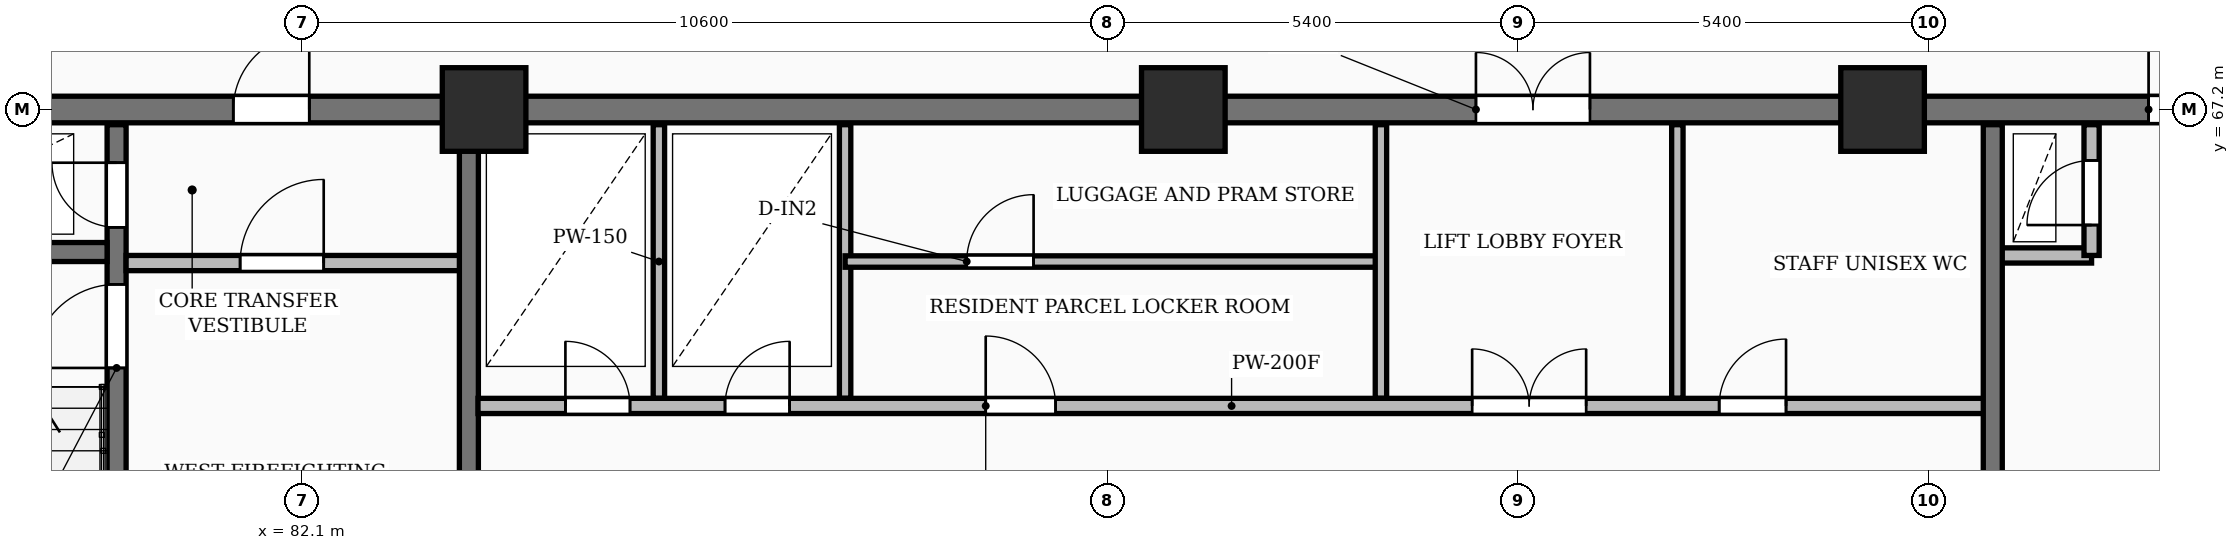
"""IFC4 building model, lengths in metres.
Left out: names, types, materials, properties, quantities, classifications, styles, units other than length and angle.
Written with IfcOpenShell. Run it as: python <this file> out.ifc"""

import sys

from ifc_helpers import new_model, si_unit, direction, frame, frame_2d, origin, origin_2d, place, context, subcontext, project, spatial, rectangle, extrude, element, fill, save


model = new_model("IFC4")
c1 = context("Model", 3, precision=1e-05, world=origin(), true_north=direction((0.0, 1.0)))
c2 = subcontext(c1, "Body", "Model", "MODEL_VIEW")
j1 = project(units=[si_unit("LENGTHUNIT", "METRE"), si_unit("PLANEANGLEUNIT", "RADIAN")], contexts=[c1])
p1 = place(None, origin())
s1 = spatial("IfcSite", under=j1, at=p1, CompositionType="ELEMENT")
p2 = place(p1, origin())
s2 = spatial("IfcBuilding", under=s1, at=p2, CompositionType="ELEMENT")
p3 = place(p2, frame((0.0, 0.0, -3.6)))
s3 = spatial("IfcBuildingStorey", under=s2, at=p3, CompositionType="ELEMENT", Elevation=-3.6)
for number, where, z_axis, x_axis in (
    (1, (84.5, 67.2, 0.0), (0.0, 0.0, 1.0), (1.0, 0.0, 0.0)),
    (2, (93.7, 67.2, 0.0), (0.0, 0.0, 1.0), (1.0, 0.0, 0.0)),
    (3, (102.9, 67.2, 0.0), (0.0, 0.0, 1.0), (1.0, 0.0, 0.0)),
):
    element("IfcColumn", number, at=place(p3, frame(where, z_axis=z_axis, x_axis=x_axis)), inside=s3, PredefinedType="COLUMN", context=c2, shape_type="SweptSolid", body=[
        extrude(rectangle(XDim=1.1, YDim=1.1, at=origin_2d()), origin(), (0.0, 0.0, 1.0), 3.6),
    ])
p4 = place(p3, frame((75.95, 67.2, 0.0), z_axis=(0.0, 0.0, 1.0), x_axis=(1.0, 0.0, 0.0)))
e4 = element("IfcWall", 4, at=p4, inside=s3, PredefinedType="SHEAR", context=c2, shape_type="SweptSolid", body=[
    extrude(rectangle(XDim=36.3, YDim=0.35, at=frame_2d((18.15, 0.0))), origin(), (0.0, 0.0, 1.0), 3.6),
])
p5 = place(p4, frame((5.25, 0.0, 0.0)))
e5 = element("IfcOpeningElement", 5, at=p5, cuts=e4, PredefinedType="OPENING", context=c2, shape_type="SweptSolid", body=[
    extrude(rectangle(XDim=1.0, YDim=2.15, at=frame_2d((0.5, 1.075))), frame((0.0, 0.185, 0.0), z_axis=(0.0, -1.0, 0.0), x_axis=(1.0, 0.0, 0.0)), (0.0, 0.0, 1.0), 0.37),
])
p6 = place(p4, frame((21.6, 0.0, 0.0)))
e6 = element("IfcOpeningElement", 6, at=p6, cuts=e4, PredefinedType="OPENING", context=c2, shape_type="SweptSolid", body=[
    extrude(rectangle(XDim=1.5, YDim=2.2, at=frame_2d((0.75, 1.1))), frame((0.0, 0.185, 0.0), z_axis=(0.0, -1.0, 0.0), x_axis=(1.0, 0.0, 0.0)), (0.0, 0.0, 1.0), 0.37),
])
p7 = place(p4, frame((30.45, 0.0, 0.0)))
e7 = element("IfcOpeningElement", 7, at=p7, cuts=e4, PredefinedType="OPENING", context=c2, shape_type="SweptSolid", body=[
    extrude(rectangle(XDim=1.0, YDim=2.15, at=frame_2d((0.5, 1.075))), frame((0.0, 0.185, 0.0), z_axis=(0.0, -1.0, 0.0), x_axis=(1.0, 0.0, 0.0)), (0.0, 0.0, 1.0), 0.37),
])
p8 = place(p3, frame((79.665, 55.4, 0.0), z_axis=(0.0, 0.0, 1.0), x_axis=(0.0, 1.0, 0.0)))
e8 = element("IfcWall", 8, at=p8, inside=s3, PredefinedType="SHEAR", context=c2, shape_type="SweptSolid", body=[
    extrude(rectangle(XDim=11.6, YDim=0.25, at=frame_2d((5.8, 0.0))), origin(), (0.0, 0.0, 1.0), 3.6),
])
p9 = place(p8, frame((0.55, 0.0, 0.0)))
e9 = element("IfcOpeningElement", 9, at=p9, cuts=e8, PredefinedType="OPENING", context=c2, shape_type="SweptSolid", body=[
    extrude(rectangle(XDim=0.85, YDim=2.05, at=frame_2d((0.425, 1.025))), frame((0.0, 0.135, 0.0), z_axis=(0.0, -1.0, 0.0), x_axis=(1.0, 0.0, 0.0)), (0.0, 0.0, 1.0), 0.27),
])
p10 = place(p8, frame((8.4, 0.0, 0.0)))
e10 = element("IfcOpeningElement", 10, at=p10, cuts=e8, PredefinedType="OPENING", context=c2, shape_type="SweptSolid", body=[
    extrude(rectangle(XDim=1.1, YDim=2.1, at=frame_2d((0.55, 1.05))), frame((0.0, 0.135, 0.0), z_axis=(0.0, -1.0, 0.0), x_axis=(1.0, 0.0, 0.0)), (0.0, 0.0, 1.0), 0.27),
])
p11 = place(p8, frame((10.25, 0.0, 0.0)))
e11 = element("IfcOpeningElement", 11, at=p11, cuts=e8, PredefinedType="OPENING", context=c2, shape_type="SweptSolid", body=[
    extrude(rectangle(XDim=0.85, YDim=2.05, at=frame_2d((0.425, 1.025))), frame((0.0, 0.135, 0.0), z_axis=(0.0, -1.0, 0.0), x_axis=(1.0, 0.0, 0.0)), (0.0, 0.0, 1.0), 0.27),
])
p12 = place(p3, frame((76.3, 65.325, 0.0), z_axis=(0.0, 0.0, 1.0), x_axis=(1.0, 0.0, 0.0)))
e12 = element("IfcWall", 12, at=p12, inside=s3, PredefinedType="SHEAR", context=c2, shape_type="SweptSolid", body=[
    extrude(rectangle(XDim=3.24, YDim=0.25, at=frame_2d((1.62, 0.0))), origin(), (0.0, 0.0, 1.0), 3.6),
])
p13 = place(p3, frame((79.79, 65.18, 0.0), z_axis=(0.0, 0.0, 1.0), x_axis=(1.0, 0.0, 0.0)))
e13 = element("IfcWall", 13, at=p13, inside=s3, PredefinedType="PARTITIONING", context=c2, shape_type="SweptSolid", body=[
    extrude(rectangle(XDim=4.39, YDim=0.2, at=frame_2d((2.195, 0.0))), origin(), (0.0, 0.0, 1.0), 3.3),
])
p14 = place(p13, frame((1.5, 0.0, 0.0)))
e14 = element("IfcOpeningElement", 14, at=p14, cuts=e13, PredefinedType="OPENING", context=c2, shape_type="SweptSolid", body=[
    extrude(rectangle(XDim=1.1, YDim=2.1, at=frame_2d((0.55, 1.05))), frame((0.0, 0.11, 0.0), z_axis=(0.0, -1.0, 0.0), x_axis=(1.0, 0.0, 0.0)), (0.0, 0.0, 1.0), 0.22),
])
p15 = place(p3, frame((84.3, 55.4, 0.0), z_axis=(0.0, 0.0, 1.0), x_axis=(0.0, 1.0, 0.0)))
e15 = element("IfcWall", 15, at=p15, inside=s3, PredefinedType="SHEAR", context=c2, shape_type="SweptSolid", body=[
    extrude(rectangle(XDim=11.6, YDim=0.25, at=frame_2d((5.8, 0.0))), origin(), (0.0, 0.0, 1.0), 3.6),
])
p16 = place(p15, frame((5.2, 0.0, 0.0)))
e16 = element("IfcOpeningElement", 16, at=p16, cuts=e15, PredefinedType="OPENING", context=c2, shape_type="SweptSolid", body=[
    extrude(rectangle(XDim=1.1, YDim=2.1, at=frame_2d((0.55, 1.05))), frame((0.0, 0.135, 0.0), z_axis=(0.0, -1.0, 0.0), x_axis=(1.0, 0.0, 0.0)), (0.0, 0.0, 1.0), 0.27),
])
for number, where, z_axis, x_axis in (
    (17, (86.8, 63.4, 0.0), (0.0, 0.0, 1.0), (0.0, 1.0, 0.0)),
    (18, (89.25, 63.4, 0.0), (0.0, 0.0, 1.0), (0.0, 1.0, 0.0)),
):
    element("IfcWall", number, at=place(p3, frame(where, z_axis=z_axis, x_axis=x_axis)), inside=s3, PredefinedType="PARTITIONING", context=c2, shape_type="SweptSolid", body=[
        extrude(rectangle(XDim=3.6, YDim=0.15, at=frame_2d((1.8, 0.0))), origin(), (0.0, 0.0, 1.0), 3.3),
    ])
p17 = place(p3, frame((89.25, 65.2, 0.0), z_axis=(0.0, 0.0, 1.0), x_axis=(1.0, 0.0, 0.0)))
e19 = element("IfcWall", 19, at=p17, inside=s3, PredefinedType="PARTITIONING", context=c2, shape_type="SweptSolid", body=[
    extrude(rectangle(XDim=7.05, YDim=0.15, at=frame_2d((3.525, 0.0))), origin(), (0.0, 0.0, 1.0), 3.3),
])
p18 = place(p17, frame((1.6, 0.0, 0.0)))
e20 = element("IfcOpeningElement", 20, at=p18, cuts=e19, PredefinedType="OPENING", context=c2, shape_type="SweptSolid", body=[
    extrude(rectangle(XDim=0.88, YDim=2.06, at=frame_2d((0.44, 1.03))), frame((0.0, 0.085, 0.0), z_axis=(0.0, -1.0, 0.0), x_axis=(1.0, 0.0, 0.0)), (0.0, 0.0, 1.0), 0.17),
])
for number, where, z_axis, x_axis in (
    (21, (96.3, 63.4, 0.0), (0.0, 0.0, 1.0), (0.0, 1.0, 0.0)),
    (22, (100.2, 63.4, 0.0), (0.0, 0.0, 1.0), (0.0, 1.0, 0.0)),
):
    element("IfcWall", number, at=place(p3, frame(where, z_axis=z_axis, x_axis=x_axis)), inside=s3, PredefinedType="PARTITIONING", context=c2, shape_type="SweptSolid", body=[
        extrude(rectangle(XDim=3.6, YDim=0.15, at=frame_2d((1.8, 0.0))), origin(), (0.0, 0.0, 1.0), 3.3),
    ])
p19 = place(p3, frame((84.42, 63.3, 0.0), z_axis=(0.0, 0.0, 1.0), x_axis=(1.0, 0.0, 0.0)))
e23 = element("IfcWall", 23, at=p19, inside=s3, PredefinedType="PARTITIONING", context=c2, shape_type="SweptSolid", body=[
    extrude(rectangle(XDim=19.83, YDim=0.2, at=frame_2d((9.915, 0.0))), origin(), (0.0, 0.0, 1.0), 3.3),
])
p20 = place(p19, frame((1.15, 0.0, 0.0)))
e24 = element("IfcOpeningElement", 24, at=p20, cuts=e23, PredefinedType="OPENING", context=c2, shape_type="SweptSolid", body=[
    extrude(rectangle(XDim=0.85, YDim=2.05, at=frame_2d((0.425, 1.025))), frame((0.0, 0.11, 0.0), z_axis=(0.0, -1.0, 0.0), x_axis=(1.0, 0.0, 0.0)), (0.0, 0.0, 1.0), 0.22),
])
p21 = place(p19, frame((3.25, 0.0, 0.0)))
e25 = element("IfcOpeningElement", 25, at=p21, cuts=e23, PredefinedType="OPENING", context=c2, shape_type="SweptSolid", body=[
    extrude(rectangle(XDim=0.85, YDim=2.05, at=frame_2d((0.425, 1.025))), frame((0.0, 0.11, 0.0), z_axis=(0.0, -1.0, 0.0), x_axis=(1.0, 0.0, 0.0)), (0.0, 0.0, 1.0), 0.22),
])
p22 = place(p19, frame((13.08, 0.0, 0.0)))
e26 = element("IfcOpeningElement", 26, at=p22, cuts=e23, PredefinedType="OPENING", context=c2, shape_type="SweptSolid", body=[
    extrude(rectangle(XDim=1.5, YDim=2.2, at=frame_2d((0.75, 1.1))), frame((0.0, 0.11, 0.0), z_axis=(0.0, -1.0, 0.0), x_axis=(1.0, 0.0, 0.0)), (0.0, 0.0, 1.0), 0.22),
])
p23 = place(p19, frame((6.68, 0.0, 0.0)))
e27 = element("IfcOpeningElement", 27, at=p23, cuts=e23, PredefinedType="OPENING", context=c2, shape_type="SweptSolid", body=[
    extrude(rectangle(XDim=0.92, YDim=2.08, at=frame_2d((0.46, 1.04))), frame((0.0, 0.11, 0.0), z_axis=(0.0, -1.0, 0.0), x_axis=(1.0, 0.0, 0.0)), (0.0, 0.0, 1.0), 0.22),
])
p24 = place(p19, frame((16.33, 0.0, 0.0)))
e28 = element("IfcOpeningElement", 28, at=p24, cuts=e23, PredefinedType="OPENING", context=c2, shape_type="SweptSolid", body=[
    extrude(rectangle(XDim=0.88, YDim=2.06, at=frame_2d((0.44, 1.03))), frame((0.0, 0.11, 0.0), z_axis=(0.0, -1.0, 0.0), x_axis=(1.0, 0.0, 0.0)), (0.0, 0.0, 1.0), 0.22),
])
p25 = place(p3, frame((104.45, 65.28, 0.0), z_axis=(0.0, 0.0, 1.0), x_axis=(1.0, 0.0, 0.0)))
e29 = element("IfcWall", 29, at=p25, inside=s3, PredefinedType="PARTITIONING", context=c2, shape_type="SweptSolid", body=[
    extrude(rectangle(XDim=1.2, YDim=0.2, at=frame_2d((0.6, 0.0))), origin(), (0.0, 0.0, 1.0), 3.3),
])
p26 = place(p3, frame((105.65, 65.28, 0.0), z_axis=(0.0, 0.0, 1.0), x_axis=(0.0, 1.0, 0.0)))
e30 = element("IfcWall", 30, at=p26, inside=s3, PredefinedType="PARTITIONING", context=c2, shape_type="SweptSolid", body=[
    extrude(rectangle(XDim=1.72, YDim=0.2, at=frame_2d((0.86, 0.0))), origin(), (0.0, 0.0, 1.0), 3.3),
])
p27 = place(p26, frame((0.4, 0.0, 0.0)))
e31 = element("IfcOpeningElement", 31, at=p27, cuts=e30, PredefinedType="OPENING", context=c2, shape_type="SweptSolid", body=[
    extrude(rectangle(XDim=0.85, YDim=2.05, at=frame_2d((0.425, 1.025))), frame((0.0, 0.11, 0.0), z_axis=(0.0, -1.0, 0.0), x_axis=(1.0, 0.0, 0.0)), (0.0, 0.0, 1.0), 0.22),
])
p28 = place(p3, frame((104.35, 58.4, 0.0), z_axis=(0.0, 0.0, 1.0), x_axis=(0.0, 1.0, 0.0)))
e32 = element("IfcWall", 32, at=p28, inside=s3, PredefinedType="SHEAR", context=c2, shape_type="SweptSolid", body=[
    extrude(rectangle(XDim=8.6, YDim=0.25, at=frame_2d((4.3, 0.0))), origin(), (0.0, 0.0, 1.0), 3.6),
])
p29 = place(p28, frame((1.8, 0.0, 0.0)))
e33 = element("IfcOpeningElement", 33, at=p29, cuts=e32, PredefinedType="OPENING", context=c2, shape_type="SweptSolid", body=[
    extrude(rectangle(XDim=1.1, YDim=2.1, at=frame_2d((0.55, 1.05))), frame((0.0, 0.135, 0.0), z_axis=(0.0, -1.0, 0.0), x_axis=(1.0, 0.0, 0.0)), (0.0, 0.0, 1.0), 0.27),
])
p30 = place(p5, origin())
e34 = element("IfcDoor", 34, at=p30, inside=s3, OperationType="SINGLE_SWING_RIGHT", PredefinedType="DOOR", context=c2, shape_type="SweptSolid", body=[
    extrude(rectangle(XDim=1.0, YDim=2.15, at=frame_2d((0.5, 1.075))), frame((0.0, 0.025, 0.0), z_axis=(0.0, -1.0, 0.0), x_axis=(1.0, 0.0, 0.0)), (0.0, 0.0, 1.0), 0.05),
])
fill(e5, e34)
p31 = place(p6, origin())
e35 = element("IfcDoor", 35, at=p31, inside=s3, OperationType="DOUBLE_DOOR_SINGLE_SWING", PredefinedType="DOOR", context=c2, shape_type="SweptSolid", body=[
    extrude(rectangle(XDim=1.5, YDim=2.2, at=frame_2d((0.75, 1.1))), frame((0.0, 0.025, 0.0), z_axis=(0.0, -1.0, 0.0), x_axis=(1.0, 0.0, 0.0)), (0.0, 0.0, 1.0), 0.05),
])
fill(e6, e35)
p32 = place(p7, origin())
e36 = element("IfcDoor", 36, at=p32, inside=s3, OperationType="SINGLE_SWING_LEFT", PredefinedType="DOOR", context=c2, shape_type="SweptSolid", body=[
    extrude(rectangle(XDim=1.0, YDim=2.15, at=frame_2d((0.5, 1.075))), frame((0.0, 0.025, 0.0), z_axis=(0.0, -1.0, 0.0), x_axis=(1.0, 0.0, 0.0)), (0.0, 0.0, 1.0), 0.05),
])
fill(e7, e36)
p33 = place(p10, origin())
e37 = element("IfcDoor", 37, at=p33, inside=s3, OperationType="SINGLE_SWING_LEFT", PredefinedType="DOOR", context=c2, shape_type="SweptSolid", body=[
    extrude(rectangle(XDim=1.1, YDim=2.1, at=frame_2d((0.55, 1.05))), frame((0.0, 0.025, 0.0), z_axis=(0.0, -1.0, 0.0), x_axis=(1.0, 0.0, 0.0)), (0.0, 0.0, 1.0), 0.05),
])
fill(e10, e37)
p34 = place(p11, origin())
e38 = element("IfcDoor", 38, at=p34, inside=s3, OperationType="SINGLE_SWING_RIGHT", PredefinedType="DOOR", context=c2, shape_type="SweptSolid", body=[
    extrude(rectangle(XDim=0.85, YDim=2.05, at=frame_2d((0.425, 1.025))), frame((0.0, 0.025, 0.0), z_axis=(0.0, -1.0, 0.0), x_axis=(1.0, 0.0, 0.0)), (0.0, 0.0, 1.0), 0.05),
])
fill(e11, e38)
p35 = place(p14, origin())
e39 = element("IfcDoor", 39, at=p35, inside=s3, OperationType="SINGLE_SWING_RIGHT", PredefinedType="DOOR", context=c2, shape_type="SweptSolid", body=[
    extrude(rectangle(XDim=1.1, YDim=2.1, at=frame_2d((0.55, 1.05))), frame((0.0, 0.025, 0.0), z_axis=(0.0, -1.0, 0.0), x_axis=(1.0, 0.0, 0.0)), (0.0, 0.0, 1.0), 0.05),
])
fill(e14, e39)
p36 = place(p18, origin())
e40 = element("IfcDoor", 40, at=p36, inside=s3, OperationType="SINGLE_SWING_RIGHT", PredefinedType="DOOR", context=c2, shape_type="SweptSolid", body=[
    extrude(rectangle(XDim=0.88, YDim=2.06, at=frame_2d((0.44, 1.03))), frame((0.0, 0.025, 0.0), z_axis=(0.0, -1.0, 0.0), x_axis=(1.0, 0.0, 0.0)), (0.0, 0.0, 1.0), 0.05),
])
fill(e20, e40)
p37 = place(p20, origin())
e41 = element("IfcDoor", 41, at=p37, inside=s3, OperationType="SINGLE_SWING_LEFT", PredefinedType="DOOR", context=c2, shape_type="SweptSolid", body=[
    extrude(rectangle(XDim=0.85, YDim=2.05, at=frame_2d((0.425, 1.025))), frame((0.0, 0.025, 0.0), z_axis=(0.0, -1.0, 0.0), x_axis=(1.0, 0.0, 0.0)), (0.0, 0.0, 1.0), 0.05),
])
fill(e24, e41)
p38 = place(p21, origin())
e42 = element("IfcDoor", 42, at=p38, inside=s3, OperationType="SINGLE_SWING_RIGHT", PredefinedType="DOOR", context=c2, shape_type="SweptSolid", body=[
    extrude(rectangle(XDim=0.85, YDim=2.05, at=frame_2d((0.425, 1.025))), frame((0.0, 0.025, 0.0), z_axis=(0.0, -1.0, 0.0), x_axis=(1.0, 0.0, 0.0)), (0.0, 0.0, 1.0), 0.05),
])
fill(e25, e42)
p39 = place(p22, origin())
e43 = element("IfcDoor", 43, at=p39, inside=s3, OperationType="DOUBLE_DOOR_SINGLE_SWING", PredefinedType="DOOR", context=c2, shape_type="SweptSolid", body=[
    extrude(rectangle(XDim=1.5, YDim=2.2, at=frame_2d((0.75, 1.1))), frame((0.0, 0.025, 0.0), z_axis=(0.0, -1.0, 0.0), x_axis=(1.0, 0.0, 0.0)), (0.0, 0.0, 1.0), 0.05),
])
fill(e26, e43)
p40 = place(p23, origin())
e44 = element("IfcDoor", 44, at=p40, inside=s3, OperationType="SINGLE_SWING_LEFT", PredefinedType="DOOR", context=c2, shape_type="SweptSolid", body=[
    extrude(rectangle(XDim=0.92, YDim=2.08, at=frame_2d((0.46, 1.04))), frame((0.0, 0.025, 0.0), z_axis=(0.0, -1.0, 0.0), x_axis=(1.0, 0.0, 0.0)), (0.0, 0.0, 1.0), 0.05),
])
fill(e27, e44)
p41 = place(p24, origin())
e45 = element("IfcDoor", 45, at=p41, inside=s3, OperationType="SINGLE_SWING_RIGHT", PredefinedType="DOOR", context=c2, shape_type="SweptSolid", body=[
    extrude(rectangle(XDim=0.88, YDim=2.06, at=frame_2d((0.44, 1.03))), frame((0.0, 0.025, 0.0), z_axis=(0.0, -1.0, 0.0), x_axis=(1.0, 0.0, 0.0)), (0.0, 0.0, 1.0), 0.05),
])
fill(e28, e45)
p42 = place(p27, origin())
e46 = element("IfcDoor", 46, at=p42, inside=s3, OperationType="SINGLE_SWING_LEFT", PredefinedType="DOOR", context=c2, shape_type="SweptSolid", body=[
    extrude(rectangle(XDim=0.85, YDim=2.05, at=frame_2d((0.425, 1.025))), frame((0.0, 0.025, 0.0), z_axis=(0.0, -1.0, 0.0), x_axis=(1.0, 0.0, 0.0)), (0.0, 0.0, 1.0), 0.05),
])
fill(e31, e46)
save(model, sys.argv[1])
